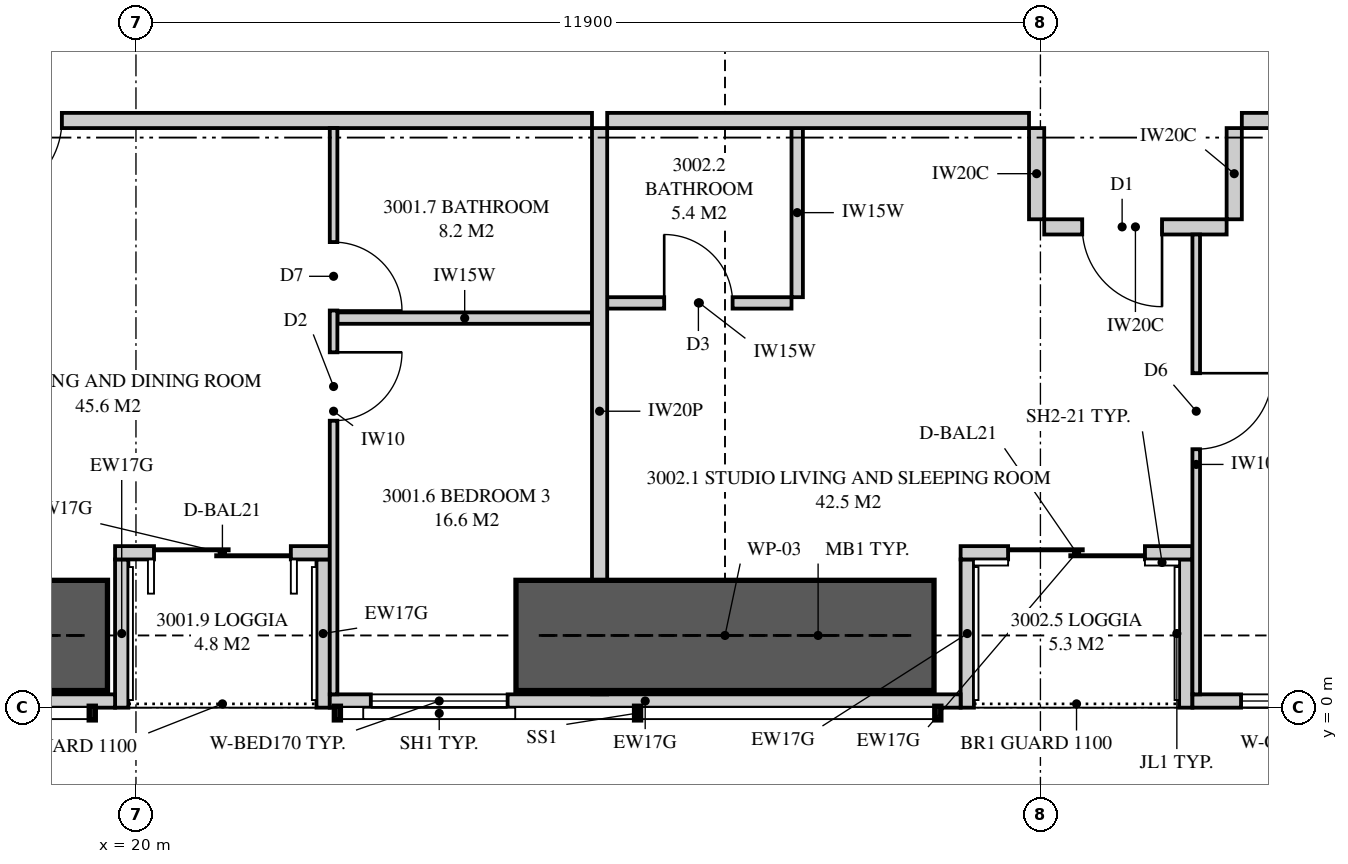
"""IFC4 building model, lengths in metres.
Left out: names, types, materials, properties, quantities, classifications, styles, units other than length and angle.
Written with IfcOpenShell. Run it as: python <this file> out.ifc"""

import sys

from ifc_helpers import new_model, si_unit, direction, frame, frame_2d, origin, place, context, subcontext, project, spatial, polyline, rectangle, outline, extrude, element, fill, save


model = new_model("IFC4")
c1 = context("Model", 3, precision=1e-05, world=origin(), true_north=direction((0.0, 1.0)))
c2 = subcontext(c1, "Body", "Model", "MODEL_VIEW")
j1 = project(units=[si_unit("LENGTHUNIT", "METRE"), si_unit("PLANEANGLEUNIT", "RADIAN")], contexts=[c1])
p1 = place(None, origin())
s1 = spatial("IfcSite", under=j1, at=p1, CompositionType="ELEMENT")
p2 = place(p1, origin())
s2 = spatial("IfcBuilding", under=s1, at=p2, CompositionType="ELEMENT")
p3 = place(p2, frame((0.0, 0.0, 111.55)))
s3 = spatial("IfcBuildingStorey", under=s2, at=p3, CompositionType="ELEMENT", Elevation=111.55)
p4 = place(p3, frame((9.051, 0.087, 0.0), z_axis=(0.0, 0.0, 1.0), x_axis=(1.0, 0.0, 0.0)))
e1 = element("IfcWall", 1, at=p4, inside=s3, PredefinedType="SOLIDWALL", context=c2, shape_type="SweptSolid", body=[
    extrude(outline(polyline([(0.0, 0.0), (10.674, 0.0), (10.674, 2.15), (7.824, 2.15), (7.824, 3.11), (7.666, 3.11), (7.666, 2.15), (7.62, 2.15), (7.62, 3.11), (0.0, 3.11), (0.0, 0.0)])), frame((0.0, 0.087, 0.0), z_axis=(0.0, -1.0, 0.0), x_axis=(1.0, 0.0, 0.0)), (0.0, 0.0, 1.0), 0.175),
])
p5 = place(p4, frame((2.399, 0.0, 0.4)))
e2 = element("IfcOpeningElement", 2, at=p5, cuts=e1, PredefinedType="OPENING", context=c2, shape_type="SweptSolid", body=[
    extrude(rectangle(XDim=1.8, YDim=1.7, at=frame_2d((0.9, 0.85))), frame((0.0, 0.097, 0.0), z_axis=(0.0, -1.0, 0.0), x_axis=(1.0, 0.0, 0.0)), (0.0, 0.0, 1.0), 0.195),
])
p6 = place(p3, frame((22.55, 0.087, 0.0), z_axis=(0.0, 0.0, 1.0), x_axis=(1.0, 0.0, 0.0)))
e3 = element("IfcWall", 3, at=p6, inside=s3, PredefinedType="SOLIDWALL", context=c2, shape_type="SweptSolid", body=[
    extrude(rectangle(XDim=8.3, YDim=0.175, at=frame_2d((4.15, 0.0))), origin(), (0.0, 0.0, 1.0), 2.15),
])
p7 = place(p6, frame((0.54, 0.0, 0.4)))
e4 = element("IfcOpeningElement", 4, at=p7, cuts=e3, PredefinedType="OPENING", context=c2, shape_type="SweptSolid", body=[
    extrude(rectangle(XDim=1.8, YDim=1.7, at=frame_2d((0.9, 0.85))), frame((0.0, 0.097, 0.0), z_axis=(0.0, -1.0, 0.0), x_axis=(1.0, 0.0, 0.0)), (0.0, 0.0, 1.0), 0.195),
])
p8 = place(p3, frame((33.9, 0.087, 0.0), z_axis=(0.0, 0.0, 1.0), x_axis=(1.0, 0.0, 0.0)))
e5 = element("IfcWall", 5, at=p8, inside=s3, PredefinedType="SOLIDWALL", context=c2, shape_type="SweptSolid", body=[
    extrude(outline(polyline([(0.0, 0.0), (7.75, 0.0), (7.75, 3.11), (4.928, 3.11), (4.928, 2.15), (4.883, 2.15), (4.883, 3.11), (4.725, 3.11), (4.725, 2.15), (0.0, 2.15), (0.0, 0.0)])), frame((0.0, 0.087, 0.0), z_axis=(0.0, -1.0, 0.0), x_axis=(1.0, 0.0, 0.0)), (0.0, 0.0, 1.0), 0.175),
])
p9 = place(p8, frame((0.64, 0.0, 0.4)))
e6 = element("IfcOpeningElement", 6, at=p9, cuts=e5, PredefinedType="OPENING", context=c2, shape_type="SweptSolid", body=[
    extrude(rectangle(XDim=1.2, YDim=1.7, at=frame_2d((0.6, 0.85))), frame((0.0, 0.097, 0.0), z_axis=(0.0, -1.0, 0.0), x_axis=(1.0, 0.0, 0.0)), (0.0, 0.0, 1.0), 0.195),
])
p10 = place(p3, frame((19.725, 2.038, 0.0), z_axis=(0.0, 0.0, 1.0), x_axis=(1.0, 0.0, 0.0)))
e7 = element("IfcWall", 7, at=p10, inside=s3, PredefinedType="SOLIDWALL", context=c2, shape_type="SweptSolid", body=[
    extrude(rectangle(XDim=2.825, YDim=0.175, at=frame_2d((1.413, 0.0))), origin(), (0.0, 0.0, 1.0), 3.11),
])
p11 = place(p10, frame((0.512, 0.0, 0.0)))
e8 = element("IfcOpeningElement", 8, at=p11, cuts=e7, PredefinedType="OPENING", context=c2, shape_type="SweptSolid", body=[
    extrude(rectangle(XDim=1.8, YDim=2.1, at=frame_2d((0.9, 1.05))), frame((0.0, 0.097, 0.0), z_axis=(0.0, -1.0, 0.0), x_axis=(1.0, 0.0, 0.0)), (0.0, 0.0, 1.0), 0.195),
])
for number, where, z_axis, x_axis in (
    (9, (19.812, 0.0, 0.0), (0.0, 0.0, 1.0), (0.0, 1.0, 0.0)),
    (10, (22.462, 0.0, 0.0), (0.0, 0.0, 1.0), (0.0, 1.0, 0.0)),
):
    element("IfcWall", number, at=place(p3, frame(where, z_axis=z_axis, x_axis=x_axis)), inside=s3, PredefinedType="SOLIDWALL", context=c2, shape_type="SweptSolid", body=[
        extrude(outline(polyline([(0.0, 0.0), (1.95, 0.0), (1.95, 3.11), (1.75, 3.11), (1.75, 2.15), (0.15, 2.15), (0.15, 3.11), (0.0, 3.11), (0.0, 0.0)])), frame((0.0, 0.087, 0.0), z_axis=(0.0, -1.0, 0.0), x_axis=(1.0, 0.0, 0.0)), (0.0, 0.0, 1.0), 0.175),
    ])
p12 = place(p3, frame((30.85, 2.038, 0.0), z_axis=(0.0, 0.0, 1.0), x_axis=(1.0, 0.0, 0.0)))
e11 = element("IfcWall", 11, at=p12, inside=s3, PredefinedType="SOLIDWALL", context=c2, shape_type="SweptSolid", body=[
    extrude(rectangle(XDim=3.05, YDim=0.175, at=frame_2d((1.525, 0.0))), origin(), (0.0, 0.0, 1.0), 3.11),
])
p13 = place(p12, frame((0.625, 0.0, 0.0)))
e12 = element("IfcOpeningElement", 12, at=p13, cuts=e11, PredefinedType="OPENING", context=c2, shape_type="SweptSolid", body=[
    extrude(rectangle(XDim=1.8, YDim=2.1, at=frame_2d((0.9, 1.05))), frame((0.0, 0.097, 0.0), z_axis=(0.0, -1.0, 0.0), x_axis=(1.0, 0.0, 0.0)), (0.0, 0.0, 1.0), 0.195),
])
for number, where, z_axis, x_axis in (
    (13, (30.938, 0.0, 0.0), (0.0, 0.0, 1.0), (0.0, 1.0, 0.0)),
    (14, (33.812, 0.0, 0.0), (0.0, 0.0, 1.0), (0.0, 1.0, 0.0)),
):
    element("IfcWall", number, at=place(p3, frame(where, z_axis=z_axis, x_axis=x_axis)), inside=s3, PredefinedType="SOLIDWALL", context=c2, shape_type="SweptSolid", body=[
        extrude(outline(polyline([(0.0, 0.0), (1.95, 0.0), (1.95, 3.11), (1.75, 3.11), (1.75, 2.15), (0.15, 2.15), (0.15, 3.11), (0.0, 3.11), (0.0, 0.0)])), frame((0.0, 0.087, 0.0), z_axis=(0.0, -1.0, 0.0), x_axis=(1.0, 0.0, 0.0)), (0.0, 0.0, 1.0), 0.175),
    ])
p14 = place(p3, frame((26.1, 0.175, 0.0), z_axis=(0.0, 0.0, 1.0), x_axis=(0.0, 1.0, 0.0)))
e15 = element("IfcWall", 15, at=p14, inside=s3, PredefinedType="PARTITIONING", context=c2, shape_type="SweptSolid", body=[
    extrude(outline(polyline([(0.529, 2.15), (0.0, 2.15), (0.0, 0.0), (0.529, 0.0), (0.529, 0.376), (1.021, 0.376), (1.021, 0.0), (7.45, 0.0), (7.45, 3.11), (1.685, 3.11), (1.685, 2.15), (1.021, 2.15), (1.021, 1.774), (0.529, 1.774), (0.529, 2.15)])), frame((0.0, 0.1, 0.0), z_axis=(0.0, -1.0, 0.0), x_axis=(1.0, 0.0, 0.0)), (0.0, 0.0, 1.0), 0.2),
])
p15 = place(p3, frame((17.775, 7.725, 0.0), z_axis=(0.0, 0.0, 1.0), x_axis=(1.0, 0.0, 0.0)))
e16 = element("IfcWall", 16, at=p15, inside=s3, PredefinedType="PARTITIONING", context=c2, shape_type="SweptSolid", body=[
    extrude(rectangle(XDim=8.225, YDim=0.2, at=frame_2d((4.113, 0.0))), origin(), (0.0, 0.0, 1.0), 3.11),
])
p16 = place(p15, frame((0.2, 0.0, 0.0)))
e17 = element("IfcOpeningElement", 17, at=p16, cuts=e16, PredefinedType="OPENING", context=c2, shape_type="SweptSolid", body=[
    extrude(rectangle(XDim=1.05, YDim=2.2, at=frame_2d((0.525, 1.1))), frame((0.0, 0.11, 0.0), z_axis=(0.0, -1.0, 0.0), x_axis=(1.0, 0.0, 0.0)), (0.0, 0.0, 1.0), 0.22),
])
p17 = place(p3, frame((22.6, 0.175, 0.0), z_axis=(0.0, 0.0, 1.0), x_axis=(0.0, 1.0, 0.0)))
e18 = element("IfcWall", 18, at=p17, inside=s3, PredefinedType="PARTITIONING", context=c2, shape_type="SweptSolid", body=[
    extrude(outline(polyline([(0.0, 0.0), (7.45, 0.0), (7.45, 3.11), (1.635, 3.11), (1.635, 2.15), (0.0, 2.15), (0.0, 3.11), (0.0, 0.0)])), frame((0.0, 0.05, 0.0), z_axis=(0.0, -1.0, 0.0), x_axis=(1.0, 0.0, 0.0)), (0.0, 0.0, 1.0), 0.1),
])
p18 = place(p17, frame((3.6, 0.0, 0.0)))
e19 = element("IfcOpeningElement", 19, at=p18, cuts=e18, PredefinedType="OPENING", context=c2, shape_type="SweptSolid", body=[
    extrude(rectangle(XDim=0.9, YDim=2.1, at=frame_2d((0.45, 1.05))), frame((0.0, 0.06, 0.0), z_axis=(0.0, -1.0, 0.0), x_axis=(1.0, 0.0, 0.0)), (0.0, 0.0, 1.0), 0.12),
])
p19 = place(p17, frame((5.05, 0.0, 0.0)))
e20 = element("IfcOpeningElement", 20, at=p19, cuts=e18, PredefinedType="OPENING", context=c2, shape_type="SweptSolid", body=[
    extrude(rectangle(XDim=0.9, YDim=2.1, at=frame_2d((0.45, 1.05))), frame((0.0, 0.06, 0.0), z_axis=(0.0, -1.0, 0.0), x_axis=(1.0, 0.0, 0.0)), (0.0, 0.0, 1.0), 0.12),
])
p20 = place(p3, frame((22.65, 5.125, 0.0), z_axis=(0.0, 0.0, 1.0), x_axis=(1.0, 0.0, 0.0)))
e21 = element("IfcWall", 21, at=p20, inside=s3, PredefinedType="PLUMBINGWALL", context=c2, shape_type="SweptSolid", body=[
    extrude(rectangle(XDim=3.35, YDim=0.15, at=frame_2d((1.675, 0.0))), origin(), (0.0, 0.0, 1.0), 3.11),
])
p21 = place(p3, frame((26.2, 7.725, 0.0), z_axis=(0.0, 0.0, 1.0), x_axis=(1.0, 0.0, 0.0)))
e22 = element("IfcWall", 22, at=p21, inside=s3, PredefinedType="PARTITIONING", context=c2, shape_type="SweptSolid", body=[
    extrude(outline(polyline([(0.0, 0.0), (5.55, 0.0), (5.55, 3.11), (1.887, 3.11), (1.887, 2.541), (1.213, 2.541), (1.213, 3.11), (0.0, 3.11), (0.0, 0.0)])), frame((0.0, 0.1, 0.0), z_axis=(0.0, -1.0, 0.0), x_axis=(1.0, 0.0, 0.0)), (0.0, 0.0, 1.0), 0.2),
])
p22 = place(p3, frame((26.2, 5.325, 0.0), z_axis=(0.0, 0.0, 1.0), x_axis=(1.0, 0.0, 0.0)))
e23 = element("IfcWall", 23, at=p22, inside=s3, PredefinedType="PLUMBINGWALL", context=c2, shape_type="SweptSolid", body=[
    extrude(outline(polyline([(0.0, 0.0), (2.425, 0.0), (2.425, 3.11), (1.862, 3.11), (1.862, 2.541), (1.238, 2.541), (1.238, 3.11), (0.0, 3.11), (0.0, 0.0)])), frame((0.0, 0.075, 0.0), z_axis=(0.0, -1.0, 0.0), x_axis=(1.0, 0.0, 0.0)), (0.0, 0.0, 1.0), 0.15),
])
p23 = place(p22, frame((0.75, 0.0, 0.0)))
e24 = element("IfcOpeningElement", 24, at=p23, cuts=e23, PredefinedType="OPENING", context=c2, shape_type="SweptSolid", body=[
    extrude(rectangle(XDim=0.9, YDim=2.1, at=frame_2d((0.45, 1.05))), frame((0.0, 0.085, 0.0), z_axis=(0.0, -1.0, 0.0), x_axis=(1.0, 0.0, 0.0)), (0.0, 0.0, 1.0), 0.17),
])
p24 = place(p3, frame((28.7, 5.4, 0.0), z_axis=(0.0, 0.0, 1.0), x_axis=(0.0, 1.0, 0.0)))
e25 = element("IfcWall", 25, at=p24, inside=s3, PredefinedType="PLUMBINGWALL", context=c2, shape_type="SweptSolid", body=[
    extrude(rectangle(XDim=2.225, YDim=0.15, at=frame_2d((1.113, 0.0))), origin(), (0.0, 0.0, 1.0), 3.11),
])
p25 = place(p3, frame((33.95, 0.175, 0.0), z_axis=(0.0, 0.0, 1.0), x_axis=(0.0, 1.0, 0.0)))
e26 = element("IfcWall", 26, at=p25, inside=s3, PredefinedType="PARTITIONING", context=c2, shape_type="SweptSolid", body=[
    extrude(outline(polyline([(0.0, 0.0), (6.05, 0.0), (6.05, 3.11), (1.635, 3.11), (1.635, 2.15), (0.0, 2.15), (0.0, 3.11), (0.0, 0.0)])), frame((0.0, 0.05, 0.0), z_axis=(0.0, -1.0, 0.0), x_axis=(1.0, 0.0, 0.0)), (0.0, 0.0, 1.0), 0.1),
])
p26 = place(p25, frame((3.225, 0.0, 0.0)))
e27 = element("IfcOpeningElement", 27, at=p26, cuts=e26, PredefinedType="OPENING", context=c2, shape_type="SweptSolid", body=[
    extrude(rectangle(XDim=1.0, YDim=2.1, at=frame_2d((0.5, 1.05))), frame((0.0, 0.06, 0.0), z_axis=(0.0, -1.0, 0.0), x_axis=(1.0, 0.0, 0.0)), (0.0, 0.0, 1.0), 0.12),
])
p27 = place(p3, frame((34.55, 7.725, 0.0), z_axis=(0.0, 0.0, 1.0), x_axis=(1.0, 0.0, 0.0)))
e28 = element("IfcWall", 28, at=p27, inside=s3, PredefinedType="PARTITIONING", context=c2, shape_type="SweptSolid", body=[
    extrude(outline(polyline([(0.0, 0.0), (5.15, 0.0), (5.15, 3.11), (4.412, 3.11), (4.412, 2.541), (3.738, 2.541), (3.738, 3.11), (0.0, 3.11), (0.0, 0.0)])), frame((0.0, 0.1, 0.0), z_axis=(0.0, -1.0, 0.0), x_axis=(1.0, 0.0, 0.0)), (0.0, 0.0, 1.0), 0.2),
])
p28 = place(p3, frame((31.95, 6.325, 0.0), z_axis=(0.0, 0.0, 1.0), x_axis=(1.0, 0.0, 0.0)))
e29 = element("IfcWall", 29, at=p28, inside=s3, PredefinedType="PARTITIONING", context=c2, shape_type="SweptSolid", body=[
    extrude(rectangle(XDim=2.4, YDim=0.2, at=frame_2d((1.2, 0.0))), origin(), (0.0, 0.0, 1.0), 3.11),
])
p29 = place(p28, frame((0.5, 0.0, 0.0)))
e30 = element("IfcOpeningElement", 30, at=p29, cuts=e29, PredefinedType="OPENING", context=c2, shape_type="SweptSolid", body=[
    extrude(rectangle(XDim=1.05, YDim=2.2, at=frame_2d((0.525, 1.1))), frame((0.0, 0.11, 0.0), z_axis=(0.0, -1.0, 0.0), x_axis=(1.0, 0.0, 0.0)), (0.0, 0.0, 1.0), 0.22),
])
for number, where, z_axis, x_axis in (
    (31, (31.85, 7.625, 0.0), (0.0, 0.0, 1.0), (0.0, -1.0, 0.0)),
    (32, (34.45, 7.625, 0.0), (0.0, 0.0, 1.0), (0.0, -1.0, 0.0)),
):
    element("IfcWall", number, at=place(p3, frame(where, z_axis=z_axis, x_axis=x_axis)), inside=s3, PredefinedType="PARTITIONING", context=c2, shape_type="SweptSolid", body=[
        extrude(rectangle(XDim=1.2, YDim=0.2, at=frame_2d((0.6, 0.0))), origin(), (0.0, 0.0, 1.0), 3.11),
    ])
for number, where, z_axis, x_axis in (
    (33, (14.125, 0.95, 0.0), (0.0, 0.0, 1.0), (1.0, 0.0, 0.0)),
    (34, (25.0, 0.95, 0.0), (0.0, 0.0, 1.0), (1.0, 0.0, 0.0)),
):
    element("IfcWall", number, at=place(p3, frame(where, z_axis=z_axis, x_axis=x_axis)), inside=s3, PredefinedType="SHEAR", context=c2, shape_type="SweptSolid", body=[
        extrude(rectangle(XDim=5.5, YDim=1.45, at=frame_2d((2.75, 0.0))), origin(), (0.0, 0.0, 1.0), 3.35),
    ])
p30 = place(p11, origin())
e35 = element("IfcDoor", 35, at=p30, inside=s3, OperationType="SLIDING_TO_LEFT", PredefinedType="DOOR", context=c2, shape_type="SweptSolid", body=[
    extrude(rectangle(XDim=1.8, YDim=2.1, at=frame_2d((0.9, 1.05))), frame((0.0, 0.025, 0.0), z_axis=(0.0, -1.0, 0.0), x_axis=(1.0, 0.0, 0.0)), (0.0, 0.0, 1.0), 0.05),
])
fill(e8, e35)
p31 = place(p7, origin())
e36 = element("IfcWindow", 36, at=p31, inside=s3, PartitioningType="SINGLE_PANEL", PredefinedType="WINDOW", context=c2, shape_type="SweptSolid", body=[
    extrude(rectangle(XDim=1.8, YDim=1.7, at=frame_2d((0.9, 0.85))), frame((0.0, 0.03, 0.0), z_axis=(0.0, -1.0, 0.0), x_axis=(1.0, 0.0, 0.0)), (0.0, 0.0, 1.0), 0.06),
])
fill(e4, e36)
p32 = place(p13, origin())
e37 = element("IfcDoor", 37, at=p32, inside=s3, OperationType="SLIDING_TO_LEFT", PredefinedType="DOOR", context=c2, shape_type="SweptSolid", body=[
    extrude(rectangle(XDim=1.8, YDim=2.1, at=frame_2d((0.9, 1.05))), frame((0.0, 0.025, 0.0), z_axis=(0.0, -1.0, 0.0), x_axis=(1.0, 0.0, 0.0)), (0.0, 0.0, 1.0), 0.05),
])
fill(e12, e37)
p33 = place(p9, origin())
e38 = element("IfcWindow", 38, at=p33, inside=s3, PartitioningType="SINGLE_PANEL", PredefinedType="WINDOW", context=c2, shape_type="SweptSolid", body=[
    extrude(rectangle(XDim=1.2, YDim=1.7, at=frame_2d((0.6, 0.85))), frame((0.0, 0.03, 0.0), z_axis=(0.0, -1.0, 0.0), x_axis=(1.0, 0.0, 0.0)), (0.0, 0.0, 1.0), 0.06),
])
fill(e6, e38)
p34 = place(p16, frame((1.05, 0.0, 0.0), z_axis=(0.0, 0.0, 1.0), x_axis=(-1.0, 0.0, 0.0)))
e39 = element("IfcDoor", 39, at=p34, inside=s3, OperationType="SINGLE_SWING_RIGHT", PredefinedType="DOOR", context=c2, shape_type="SweptSolid", body=[
    extrude(rectangle(XDim=1.05, YDim=2.2, at=frame_2d((0.525, 1.1))), frame((0.0, 0.025, 0.0), z_axis=(0.0, -1.0, 0.0), x_axis=(1.0, 0.0, 0.0)), (0.0, 0.0, 1.0), 0.05),
])
fill(e17, e39)
p35 = place(p18, frame((0.9, 0.0, 0.0), z_axis=(0.0, 0.0, 1.0), x_axis=(-1.0, 0.0, 0.0)))
e40 = element("IfcDoor", 40, at=p35, inside=s3, OperationType="SINGLE_SWING_LEFT", PredefinedType="DOOR", context=c2, shape_type="SweptSolid", body=[
    extrude(rectangle(XDim=0.9, YDim=2.1, at=frame_2d((0.45, 1.05))), frame((0.0, 0.025, 0.0), z_axis=(0.0, -1.0, 0.0), x_axis=(1.0, 0.0, 0.0)), (0.0, 0.0, 1.0), 0.05),
])
fill(e19, e40)
p36 = place(p19, frame((0.9, 0.0, 0.0), z_axis=(0.0, 0.0, 1.0), x_axis=(-1.0, 0.0, 0.0)))
e41 = element("IfcDoor", 41, at=p36, inside=s3, OperationType="SINGLE_SWING_RIGHT", PredefinedType="DOOR", context=c2, shape_type="SweptSolid", body=[
    extrude(rectangle(XDim=0.9, YDim=2.1, at=frame_2d((0.45, 1.05))), frame((0.0, 0.025, 0.0), z_axis=(0.0, -1.0, 0.0), x_axis=(1.0, 0.0, 0.0)), (0.0, 0.0, 1.0), 0.05),
])
fill(e20, e41)
p37 = place(p29, frame((1.05, 0.0, 0.0), z_axis=(0.0, 0.0, 1.0), x_axis=(-1.0, 0.0, 0.0)))
e42 = element("IfcDoor", 42, at=p37, inside=s3, OperationType="SINGLE_SWING_LEFT", PredefinedType="DOOR", context=c2, shape_type="SweptSolid", body=[
    extrude(rectangle(XDim=1.05, YDim=2.2, at=frame_2d((0.525, 1.1))), frame((0.0, 0.025, 0.0), z_axis=(0.0, -1.0, 0.0), x_axis=(1.0, 0.0, 0.0)), (0.0, 0.0, 1.0), 0.05),
])
fill(e30, e42)
p38 = place(p23, origin())
e43 = element("IfcDoor", 43, at=p38, inside=s3, OperationType="SINGLE_SWING_LEFT", PredefinedType="DOOR", context=c2, shape_type="SweptSolid", body=[
    extrude(rectangle(XDim=0.9, YDim=2.1, at=frame_2d((0.45, 1.05))), frame((0.0, 0.025, 0.0), z_axis=(0.0, -1.0, 0.0), x_axis=(1.0, 0.0, 0.0)), (0.0, 0.0, 1.0), 0.05),
])
fill(e24, e43)
p39 = place(p26, frame((1.0, 0.0, 0.0), z_axis=(0.0, 0.0, 1.0), x_axis=(-1.0, 0.0, 0.0)))
e44 = element("IfcDoor", 44, at=p39, inside=s3, OperationType="SINGLE_SWING_LEFT", PredefinedType="DOOR", context=c2, shape_type="SweptSolid", body=[
    extrude(rectangle(XDim=1.0, YDim=2.1, at=frame_2d((0.5, 1.05))), frame((0.0, 0.025, 0.0), z_axis=(0.0, -1.0, 0.0), x_axis=(1.0, 0.0, 0.0)), (0.0, 0.0, 1.0), 0.05),
])
fill(e27, e44)
save(model, sys.argv[1])
